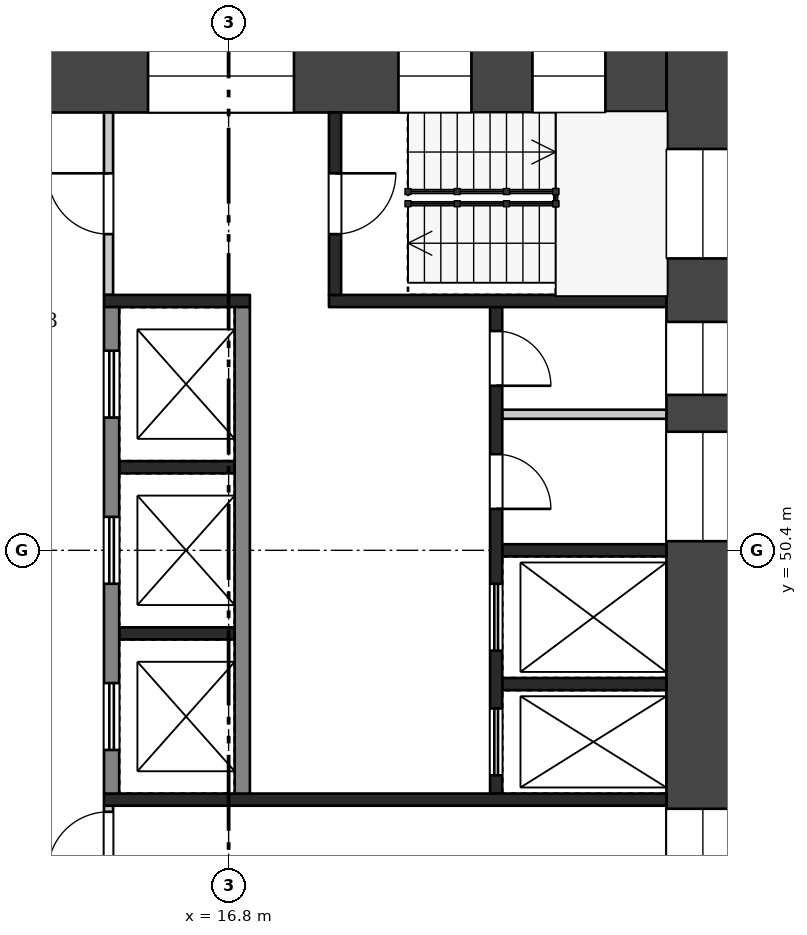
"""IFC4 building model, lengths in metres.
Left out: names, types, materials, properties, quantities, classifications, styles, units other than length and angle.
Written with IfcOpenShell. Run it as: python <this file> out.ifc"""

import sys

from ifc_helpers import new_model, si_unit, direction, frame, frame_2d, origin, place, context, subcontext, project, spatial, rectangle, extrude, element, fill, save


model = new_model("IFC4")
c1 = context("Model", 3, precision=1e-05, world=origin(), true_north=direction((0.0, 1.0)))
c2 = subcontext(c1, "Body", "Model", "MODEL_VIEW")
j1 = project(units=[si_unit("LENGTHUNIT", "METRE"), si_unit("PLANEANGLEUNIT", "RADIAN")], contexts=[c1])
p1 = place(None, origin())
s1 = spatial("IfcSite", under=j1, at=p1, CompositionType="ELEMENT")
p2 = place(p1, origin())
s2 = spatial("IfcBuilding", under=s1, at=p2, CompositionType="ELEMENT")
p3 = place(p2, frame((0.0, 0.0, 189.7)))
s3 = spatial("IfcBuildingStorey", under=s2, at=p3, CompositionType="ELEMENT", Elevation=189.7)
p4 = place(p3, frame((24.6, 58.8, 0.0), z_axis=(0.0, 0.0, 1.0), x_axis=(0.0, -1.0, 0.0)))
e1 = element("IfcWall", 1, at=p4, inside=s3, PredefinedType="SHEAR", context=c2, shape_type="SweptSolid", body=[
    extrude(rectangle(XDim=16.8, YDim=1.2, at=frame_2d((8.4, 0.0))), origin(), (0.0, 0.0, 1.0), 3.22),
])
p5 = place(p4, frame((1.8, 0.0, 0.5)))
e2 = element("IfcOpeningElement", 2, at=p5, cuts=e1, PredefinedType="OPENING", context=c2, shape_type="SweptSolid", body=[
    extrude(rectangle(XDim=1.8, YDim=2.4, at=frame_2d((0.9, 1.2))), frame((0.0, 0.61, 0.0), z_axis=(0.0, -1.0, 0.0), x_axis=(1.0, 0.0, 0.0)), (0.0, 0.0, 1.0), 1.22),
])
p6 = place(p4, frame((4.644, 0.0, 1.6)))
e3 = element("IfcOpeningElement", 3, at=p6, cuts=e1, PredefinedType="OPENING", context=c2, shape_type="SweptSolid", body=[
    extrude(rectangle(XDim=1.2, YDim=1.2, at=frame_2d((0.6, 0.6))), frame((0.0, 0.61, 0.0), z_axis=(0.0, -1.0, 0.0), x_axis=(1.0, 0.0, 0.0)), (0.0, 0.0, 1.0), 1.22),
])
p7 = place(p4, frame((6.45, 0.0, 1.6)))
e4 = element("IfcOpeningElement", 4, at=p7, cuts=e1, PredefinedType="OPENING", context=c2, shape_type="SweptSolid", body=[
    extrude(rectangle(XDim=1.8, YDim=1.2, at=frame_2d((0.9, 0.6))), frame((0.0, 0.61, 0.0), z_axis=(0.0, -1.0, 0.0), x_axis=(1.0, 0.0, 0.0)), (0.0, 0.0, 1.0), 1.22),
])
p8 = place(p4, frame((12.65, 0.0, 0.6)))
e5 = element("IfcOpeningElement", 5, at=p8, cuts=e1, PredefinedType="OPENING", context=c2, shape_type="SweptSolid", body=[
    extrude(rectangle(XDim=1.0, YDim=2.1, at=frame_2d((0.5, 1.05))), frame((0.0, 0.61, 0.0), z_axis=(0.0, -1.0, 0.0), x_axis=(1.0, 0.0, 0.0)), (0.0, 0.0, 1.0), 1.22),
])
p9 = place(p4, frame((14.175, 0.0, 1.6)))
e6 = element("IfcOpeningElement", 6, at=p9, cuts=e1, PredefinedType="OPENING", context=c2, shape_type="SweptSolid", body=[
    extrude(rectangle(XDim=1.2, YDim=1.2, at=frame_2d((0.6, 0.6))), frame((0.0, 0.61, 0.0), z_axis=(0.0, -1.0, 0.0), x_axis=(1.0, 0.0, 0.0)), (0.0, 0.0, 1.0), 1.22),
])
p10 = place(p3, frame((9.6, 58.2, 0.0), z_axis=(0.0, 0.0, 1.0), x_axis=(1.0, 0.0, 0.0)))
e7 = element("IfcWall", 7, at=p10, inside=s3, PredefinedType="SHEAR", context=c2, shape_type="SweptSolid", body=[
    extrude(rectangle(XDim=14.4, YDim=1.2, at=frame_2d((7.2, 0.0))), origin(), (0.0, 0.0, 1.0), 3.22),
])
p11 = place(p10, frame((1.105, 0.0, 0.6)))
e8 = element("IfcOpeningElement", 8, at=p11, cuts=e7, PredefinedType="OPENING", context=c2, shape_type="SweptSolid", body=[
    extrude(rectangle(XDim=3.0, YDim=2.1, at=frame_2d((1.5, 1.05))), frame((0.0, 0.61, 0.0), z_axis=(0.0, -1.0, 0.0), x_axis=(1.0, 0.0, 0.0)), (0.0, 0.0, 1.0), 1.22),
])
p12 = place(p10, frame((5.875, 0.0, 0.6)))
e9 = element("IfcOpeningElement", 9, at=p12, cuts=e7, PredefinedType="OPENING", context=c2, shape_type="SweptSolid", body=[
    extrude(rectangle(XDim=2.4, YDim=2.1, at=frame_2d((1.2, 1.05))), frame((0.0, 0.61, 0.0), z_axis=(0.0, -1.0, 0.0), x_axis=(1.0, 0.0, 0.0)), (0.0, 0.0, 1.0), 1.22),
])
p13 = place(p10, frame((9.993, 0.0, 0.5)))
e10 = element("IfcOpeningElement", 10, at=p13, cuts=e7, PredefinedType="OPENING", context=c2, shape_type="SweptSolid", body=[
    extrude(rectangle(XDim=1.2, YDim=2.4, at=frame_2d((0.6, 1.2))), frame((0.0, 0.61, 0.0), z_axis=(0.0, -1.0, 0.0), x_axis=(1.0, 0.0, 0.0)), (0.0, 0.0, 1.0), 1.22),
])
p14 = place(p10, frame((12.197, 0.0, 0.5)))
e11 = element("IfcOpeningElement", 11, at=p14, cuts=e7, PredefinedType="OPENING", context=c2, shape_type="SweptSolid", body=[
    extrude(rectangle(XDim=1.2, YDim=2.4, at=frame_2d((0.6, 1.2))), frame((0.0, 0.61, 0.0), z_axis=(0.0, -1.0, 0.0), x_axis=(1.0, 0.0, 0.0)), (0.0, 0.0, 1.0), 1.22),
])
for number, where, z_axis, x_axis in (
    (12, (15.0, 51.767, 0.0), (0.0, 0.0, 1.0), (1.0, 0.0, 0.0)),
    (13, (15.0, 49.033, 0.0), (0.0, 0.0, 1.0), (1.0, 0.0, 0.0)),
):
    element("IfcWall", number, at=place(p3, frame(where, z_axis=z_axis, x_axis=x_axis)), inside=s3, PredefinedType="SHEAR", context=c2, shape_type="SweptSolid", body=[
        extrude(rectangle(XDim=1.9, YDim=0.2, at=frame_2d((0.95, 0.0))), origin(), (0.0, 0.0, 1.0), 3.22),
    ])
p15 = place(p3, frame((14.875, 54.4, 0.0), z_axis=(0.0, 0.0, 1.0), x_axis=(0.0, -1.0, 0.0)))
e14 = element("IfcWall", 14, at=p15, inside=s3, PredefinedType="SHEAR", context=c2, shape_type="SweptSolid", body=[
    extrude(rectangle(XDim=8.0, YDim=0.25, at=frame_2d((4.0, 0.0))), origin(), (0.0, 0.0, 1.0), 3.22),
])
p16 = place(p15, frame((0.717, 0.0, 0.0)))
e15 = element("IfcOpeningElement", 15, at=p16, cuts=e14, PredefinedType="OPENING", context=c2, shape_type="SweptSolid", body=[
    extrude(rectangle(XDim=1.1, YDim=2.1, at=frame_2d((0.55, 1.05))), frame((0.0, 0.135, 0.0), z_axis=(0.0, -1.0, 0.0), x_axis=(1.0, 0.0, 0.0)), (0.0, 0.0, 1.0), 0.27),
])
p17 = place(p15, frame((3.45, 0.0, 0.0)))
e16 = element("IfcOpeningElement", 16, at=p17, cuts=e14, PredefinedType="OPENING", context=c2, shape_type="SweptSolid", body=[
    extrude(rectangle(XDim=1.1, YDim=2.1, at=frame_2d((0.55, 1.05))), frame((0.0, 0.135, 0.0), z_axis=(0.0, -1.0, 0.0), x_axis=(1.0, 0.0, 0.0)), (0.0, 0.0, 1.0), 0.27),
])
p18 = place(p15, frame((6.183, 0.0, 0.0)))
e17 = element("IfcOpeningElement", 17, at=p18, cuts=e14, PredefinedType="OPENING", context=c2, shape_type="SweptSolid", body=[
    extrude(rectangle(XDim=1.1, YDim=2.1, at=frame_2d((0.55, 1.05))), frame((0.0, 0.135, 0.0), z_axis=(0.0, -1.0, 0.0), x_axis=(1.0, 0.0, 0.0)), (0.0, 0.0, 1.0), 0.27),
])
p19 = place(p3, frame((17.025, 54.4, 0.0), z_axis=(0.0, 0.0, 1.0), x_axis=(0.0, -1.0, 0.0)))
e18 = element("IfcWall", 18, at=p19, inside=s3, PredefinedType="SHEAR", context=c2, shape_type="SweptSolid", body=[
    extrude(rectangle(XDim=8.0, YDim=0.25, at=frame_2d((4.0, 0.0))), origin(), (0.0, 0.0, 1.0), 3.22),
])
for number, where, z_axis, x_axis in (
    (19, (21.3, 50.4, 0.0), (0.0, 0.0, 1.0), (1.0, 0.0, 0.0)),
    (20, (21.3, 48.2, 0.0), (0.0, 0.0, 1.0), (1.0, 0.0, 0.0)),
):
    element("IfcWall", number, at=place(p3, frame(where, z_axis=z_axis, x_axis=x_axis)), inside=s3, PredefinedType="SHEAR", context=c2, shape_type="SweptSolid", body=[
        extrude(rectangle(XDim=2.7, YDim=0.2, at=frame_2d((1.35, 0.0))), origin(), (0.0, 0.0, 1.0), 3.22),
    ])
p20 = place(p3, frame((21.3, 52.637, 0.0), z_axis=(0.0, 0.0, 1.0), x_axis=(1.0, 0.0, 0.0)))
e21 = element("IfcWall", 21, at=p20, inside=s3, PredefinedType="PARTITIONING", context=c2, shape_type="SweptSolid", body=[
    extrude(rectangle(XDim=2.7, YDim=0.15, at=frame_2d((1.35, 0.0))), origin(), (0.0, 0.0, 1.0), 3.22),
])
p21 = place(p3, frame((21.2, 54.4, 0.0), z_axis=(0.0, 0.0, 1.0), x_axis=(0.0, -1.0, 0.0)))
e22 = element("IfcWall", 22, at=p21, inside=s3, PredefinedType="SHEAR", context=c2, shape_type="SweptSolid", body=[
    extrude(rectangle(XDim=8.0, YDim=0.2, at=frame_2d((4.0, 0.0))), origin(), (0.0, 0.0, 1.0), 3.22),
])
p22 = place(p21, frame((0.394, 0.0, 0.0)))
e23 = element("IfcOpeningElement", 23, at=p22, cuts=e22, PredefinedType="OPENING", context=c2, shape_type="SweptSolid", body=[
    extrude(rectangle(XDim=0.9, YDim=2.1, at=frame_2d((0.45, 1.05))), frame((0.0, 0.11, 0.0), z_axis=(0.0, -1.0, 0.0), x_axis=(1.0, 0.0, 0.0)), (0.0, 0.0, 1.0), 0.22),
])
p23 = place(p21, frame((2.419, 0.0, 0.0)))
e24 = element("IfcOpeningElement", 24, at=p23, cuts=e22, PredefinedType="OPENING", context=c2, shape_type="SweptSolid", body=[
    extrude(rectangle(XDim=0.9, YDim=2.1, at=frame_2d((0.45, 1.05))), frame((0.0, 0.11, 0.0), z_axis=(0.0, -1.0, 0.0), x_axis=(1.0, 0.0, 0.0)), (0.0, 0.0, 1.0), 0.22),
])
p24 = place(p21, frame((4.55, 0.0, 0.0)))
e25 = element("IfcOpeningElement", 25, at=p24, cuts=e22, PredefinedType="OPENING", context=c2, shape_type="SweptSolid", body=[
    extrude(rectangle(XDim=1.1, YDim=2.1, at=frame_2d((0.55, 1.05))), frame((0.0, 0.11, 0.0), z_axis=(0.0, -1.0, 0.0), x_axis=(1.0, 0.0, 0.0)), (0.0, 0.0, 1.0), 0.22),
])
p25 = place(p21, frame((6.6, 0.0, 0.0)))
e26 = element("IfcOpeningElement", 26, at=p25, cuts=e22, PredefinedType="OPENING", context=c2, shape_type="SweptSolid", body=[
    extrude(rectangle(XDim=1.1, YDim=2.1, at=frame_2d((0.55, 1.05))), frame((0.0, 0.11, 0.0), z_axis=(0.0, -1.0, 0.0), x_axis=(1.0, 0.0, 0.0)), (0.0, 0.0, 1.0), 0.22),
])
p26 = place(p3, frame((14.75, 54.5, 0.0), z_axis=(0.0, 0.0, 1.0), x_axis=(1.0, 0.0, 0.0)))
e27 = element("IfcWall", 27, at=p26, inside=s3, PredefinedType="SHEAR", context=c2, shape_type="SweptSolid", body=[
    extrude(rectangle(XDim=2.4, YDim=0.2, at=frame_2d((1.2, 0.0))), origin(), (0.0, 0.0, 1.0), 3.22),
])
p27 = place(p3, frame((18.45, 54.5, 0.0), z_axis=(0.0, 0.0, 1.0), x_axis=(1.0, 0.0, 0.0)))
e28 = element("IfcWall", 28, at=p27, inside=s3, PredefinedType="SHEAR", context=c2, shape_type="SweptSolid", body=[
    extrude(rectangle(XDim=5.55, YDim=0.2, at=frame_2d((2.775, 0.0))), origin(), (0.0, 0.0, 1.0), 3.22),
])
p28 = place(p3, frame((14.825, 57.6, 0.0), z_axis=(0.0, 0.0, 1.0), x_axis=(0.0, -1.0, 0.0)))
e29 = element("IfcWall", 29, at=p28, inside=s3, PredefinedType="PARTITIONING", context=c2, shape_type="SweptSolid", body=[
    extrude(rectangle(XDim=3.0, YDim=0.15, at=frame_2d((1.5, 0.0))), origin(), (0.0, 0.0, 1.0), 3.22),
])
p29 = place(p28, frame((1.0, 0.0, 0.0)))
e30 = element("IfcOpeningElement", 30, at=p29, cuts=e29, PredefinedType="OPENING", context=c2, shape_type="SweptSolid", body=[
    extrude(rectangle(XDim=1.0, YDim=2.1, at=frame_2d((0.5, 1.05))), frame((0.0, 0.085, 0.0), z_axis=(0.0, -1.0, 0.0), x_axis=(1.0, 0.0, 0.0)), (0.0, 0.0, 1.0), 0.17),
])
p30 = place(p3, frame((18.55, 57.6, 0.0), z_axis=(0.0, 0.0, 1.0), x_axis=(0.0, -1.0, 0.0)))
e31 = element("IfcWall", 31, at=p30, inside=s3, PredefinedType="SHEAR", context=c2, shape_type="SweptSolid", body=[
    extrude(rectangle(XDim=3.0, YDim=0.2, at=frame_2d((1.5, 0.0))), origin(), (0.0, 0.0, 1.0), 3.22),
])
p31 = place(p30, frame((1.0, 0.0, 0.0)))
e32 = element("IfcOpeningElement", 32, at=p31, cuts=e31, PredefinedType="OPENING", context=c2, shape_type="SweptSolid", body=[
    extrude(rectangle(XDim=1.0, YDim=2.1, at=frame_2d((0.5, 1.05))), frame((0.0, 0.11, 0.0), z_axis=(0.0, -1.0, 0.0), x_axis=(1.0, 0.0, 0.0)), (0.0, 0.0, 1.0), 0.22),
])
p32 = place(p3, frame((14.75, 46.3, 0.0), z_axis=(0.0, 0.0, 1.0), x_axis=(1.0, 0.0, 0.0)))
e33 = element("IfcWall", 33, at=p32, inside=s3, PredefinedType="SHEAR", context=c2, shape_type="SweptSolid", body=[
    extrude(rectangle(XDim=9.25, YDim=0.2, at=frame_2d((4.625, 0.0))), origin(), (0.0, 0.0, 1.0), 3.22),
])
p33 = place(p3, frame((14.825, 46.2, 0.0), z_axis=(0.0, 0.0, 1.0), x_axis=(0.0, -1.0, 0.0)))
e34 = element("IfcWall", 34, at=p33, inside=s3, PredefinedType="PARTITIONING", context=c2, shape_type="SweptSolid", body=[
    extrude(rectangle(XDim=3.0, YDim=0.15, at=frame_2d((1.5, 0.0))), origin(), (0.0, 0.0, 1.0), 3.22),
])
p34 = place(p33, frame((0.1, 0.0, 0.0)))
e35 = element("IfcOpeningElement", 35, at=p34, cuts=e34, PredefinedType="OPENING", context=c2, shape_type="SweptSolid", body=[
    extrude(rectangle(XDim=1.0, YDim=2.1, at=frame_2d((0.5, 1.05))), frame((0.0, 0.085, 0.0), z_axis=(0.0, -1.0, 0.0), x_axis=(1.0, 0.0, 0.0)), (0.0, 0.0, 1.0), 0.17),
])
p35 = place(p16, origin())
e36 = element("IfcDoor", 36, at=p35, inside=s3, OperationType="DOUBLE_DOOR_SLIDING", PredefinedType="DOOR", context=c2, shape_type="SweptSolid", body=[
    extrude(rectangle(XDim=1.1, YDim=2.1, at=frame_2d((0.55, 1.05))), frame((0.0, 0.025, 0.0), z_axis=(0.0, -1.0, 0.0), x_axis=(1.0, 0.0, 0.0)), (0.0, 0.0, 1.0), 0.05),
])
fill(e15, e36)
p36 = place(p17, origin())
e37 = element("IfcDoor", 37, at=p36, inside=s3, OperationType="DOUBLE_DOOR_SLIDING", PredefinedType="DOOR", context=c2, shape_type="SweptSolid", body=[
    extrude(rectangle(XDim=1.1, YDim=2.1, at=frame_2d((0.55, 1.05))), frame((0.0, 0.025, 0.0), z_axis=(0.0, -1.0, 0.0), x_axis=(1.0, 0.0, 0.0)), (0.0, 0.0, 1.0), 0.05),
])
fill(e16, e37)
p37 = place(p18, origin())
e38 = element("IfcDoor", 38, at=p37, inside=s3, OperationType="DOUBLE_DOOR_SLIDING", PredefinedType="DOOR", context=c2, shape_type="SweptSolid", body=[
    extrude(rectangle(XDim=1.1, YDim=2.1, at=frame_2d((0.55, 1.05))), frame((0.0, 0.025, 0.0), z_axis=(0.0, -1.0, 0.0), x_axis=(1.0, 0.0, 0.0)), (0.0, 0.0, 1.0), 0.05),
])
fill(e17, e38)
p38 = place(p22, origin())
e39 = element("IfcDoor", 39, at=p38, inside=s3, OperationType="SINGLE_SWING_RIGHT", PredefinedType="DOOR", context=c2, shape_type="SweptSolid", body=[
    extrude(rectangle(XDim=0.9, YDim=2.1, at=frame_2d((0.45, 1.05))), frame((0.0, 0.025, 0.0), z_axis=(0.0, -1.0, 0.0), x_axis=(1.0, 0.0, 0.0)), (0.0, 0.0, 1.0), 0.05),
])
fill(e23, e39)
p39 = place(p23, origin())
e40 = element("IfcDoor", 40, at=p39, inside=s3, OperationType="SINGLE_SWING_RIGHT", PredefinedType="DOOR", context=c2, shape_type="SweptSolid", body=[
    extrude(rectangle(XDim=0.9, YDim=2.1, at=frame_2d((0.45, 1.05))), frame((0.0, 0.025, 0.0), z_axis=(0.0, -1.0, 0.0), x_axis=(1.0, 0.0, 0.0)), (0.0, 0.0, 1.0), 0.05),
])
fill(e24, e40)
p40 = place(p24, origin())
e41 = element("IfcDoor", 41, at=p40, inside=s3, OperationType="DOUBLE_DOOR_SLIDING", PredefinedType="DOOR", context=c2, shape_type="SweptSolid", body=[
    extrude(rectangle(XDim=1.1, YDim=2.1, at=frame_2d((0.55, 1.05))), frame((0.0, 0.025, 0.0), z_axis=(0.0, -1.0, 0.0), x_axis=(1.0, 0.0, 0.0)), (0.0, 0.0, 1.0), 0.05),
])
fill(e25, e41)
p41 = place(p25, origin())
e42 = element("IfcDoor", 42, at=p41, inside=s3, OperationType="DOUBLE_DOOR_SLIDING", PredefinedType="DOOR", context=c2, shape_type="SweptSolid", body=[
    extrude(rectangle(XDim=1.1, YDim=2.1, at=frame_2d((0.55, 1.05))), frame((0.0, 0.025, 0.0), z_axis=(0.0, -1.0, 0.0), x_axis=(1.0, 0.0, 0.0)), (0.0, 0.0, 1.0), 0.05),
])
fill(e26, e42)
p42 = place(p29, frame((1.0, 0.0, 0.0), z_axis=(0.0, 0.0, 1.0), x_axis=(-1.0, 0.0, 0.0)))
e43 = element("IfcDoor", 43, at=p42, inside=s3, OperationType="SINGLE_SWING_RIGHT", PredefinedType="DOOR", context=c2, shape_type="SweptSolid", body=[
    extrude(rectangle(XDim=1.0, YDim=2.1, at=frame_2d((0.5, 1.05))), frame((0.0, 0.025, 0.0), z_axis=(0.0, -1.0, 0.0), x_axis=(1.0, 0.0, 0.0)), (0.0, 0.0, 1.0), 0.05),
])
fill(e30, e43)
p43 = place(p31, origin())
e44 = element("IfcDoor", 44, at=p43, inside=s3, OperationType="SINGLE_SWING_LEFT", PredefinedType="DOOR", context=c2, shape_type="SweptSolid", body=[
    extrude(rectangle(XDim=1.0, YDim=2.1, at=frame_2d((0.5, 1.05))), frame((0.0, 0.025, 0.0), z_axis=(0.0, -1.0, 0.0), x_axis=(1.0, 0.0, 0.0)), (0.0, 0.0, 1.0), 0.05),
])
fill(e32, e44)
p44 = place(p34, frame((1.0, 0.0, 0.0), z_axis=(0.0, 0.0, 1.0), x_axis=(-1.0, 0.0, 0.0)))
e45 = element("IfcDoor", 45, at=p44, inside=s3, OperationType="SINGLE_SWING_LEFT", PredefinedType="DOOR", context=c2, shape_type="SweptSolid", body=[
    extrude(rectangle(XDim=1.0, YDim=2.1, at=frame_2d((0.5, 1.05))), frame((0.0, 0.025, 0.0), z_axis=(0.0, -1.0, 0.0), x_axis=(1.0, 0.0, 0.0)), (0.0, 0.0, 1.0), 0.05),
])
fill(e35, e45)
p45 = place(p5, origin())
e46 = element("IfcWindow", 46, at=p45, inside=s3, PartitioningType="SINGLE_PANEL", PredefinedType="WINDOW", context=c2, shape_type="SweptSolid", body=[
    extrude(rectangle(XDim=1.8, YDim=2.4, at=frame_2d((0.9, 1.2))), frame((0.0, 0.03, 0.0), z_axis=(0.0, -1.0, 0.0), x_axis=(1.0, 0.0, 0.0)), (0.0, 0.0, 1.0), 0.06),
])
fill(e2, e46)
p46 = place(p6, origin())
e47 = element("IfcWindow", 47, at=p46, inside=s3, PartitioningType="SINGLE_PANEL", PredefinedType="WINDOW", context=c2, shape_type="SweptSolid", body=[
    extrude(rectangle(XDim=1.2, YDim=1.2, at=frame_2d((0.6, 0.6))), frame((0.0, 0.03, 0.0), z_axis=(0.0, -1.0, 0.0), x_axis=(1.0, 0.0, 0.0)), (0.0, 0.0, 1.0), 0.06),
])
fill(e3, e47)
p47 = place(p7, origin())
e48 = element("IfcWindow", 48, at=p47, inside=s3, PartitioningType="SINGLE_PANEL", PredefinedType="WINDOW", context=c2, shape_type="SweptSolid", body=[
    extrude(rectangle(XDim=1.8, YDim=1.2, at=frame_2d((0.9, 0.6))), frame((0.0, 0.03, 0.0), z_axis=(0.0, -1.0, 0.0), x_axis=(1.0, 0.0, 0.0)), (0.0, 0.0, 1.0), 0.06),
])
fill(e4, e48)
p48 = place(p8, origin())
e49 = element("IfcWindow", 49, at=p48, inside=s3, PartitioningType="SINGLE_PANEL", PredefinedType="WINDOW", context=c2, shape_type="SweptSolid", body=[
    extrude(rectangle(XDim=1.0, YDim=2.1, at=frame_2d((0.5, 1.05))), frame((0.0, 0.03, 0.0), z_axis=(0.0, -1.0, 0.0), x_axis=(1.0, 0.0, 0.0)), (0.0, 0.0, 1.0), 0.06),
])
fill(e5, e49)
p49 = place(p12, origin())
e50 = element("IfcWindow", 50, at=p49, inside=s3, PartitioningType="SINGLE_PANEL", PredefinedType="WINDOW", context=c2, shape_type="SweptSolid", body=[
    extrude(rectangle(XDim=2.4, YDim=2.1, at=frame_2d((1.2, 1.05))), frame((0.0, 0.03, 0.0), z_axis=(0.0, -1.0, 0.0), x_axis=(1.0, 0.0, 0.0)), (0.0, 0.0, 1.0), 0.06),
])
fill(e9, e50)
p50 = place(p13, origin())
e51 = element("IfcWindow", 51, at=p50, inside=s3, PartitioningType="SINGLE_PANEL", PredefinedType="WINDOW", context=c2, shape_type="SweptSolid", body=[
    extrude(rectangle(XDim=1.2, YDim=2.4, at=frame_2d((0.6, 1.2))), frame((0.0, 0.03, 0.0), z_axis=(0.0, -1.0, 0.0), x_axis=(1.0, 0.0, 0.0)), (0.0, 0.0, 1.0), 0.06),
])
fill(e10, e51)
p51 = place(p14, origin())
e52 = element("IfcWindow", 52, at=p51, inside=s3, PartitioningType="SINGLE_PANEL", PredefinedType="WINDOW", context=c2, shape_type="SweptSolid", body=[
    extrude(rectangle(XDim=1.2, YDim=2.4, at=frame_2d((0.6, 1.2))), frame((0.0, 0.03, 0.0), z_axis=(0.0, -1.0, 0.0), x_axis=(1.0, 0.0, 0.0)), (0.0, 0.0, 1.0), 0.06),
])
fill(e11, e52)
save(model, sys.argv[1])
